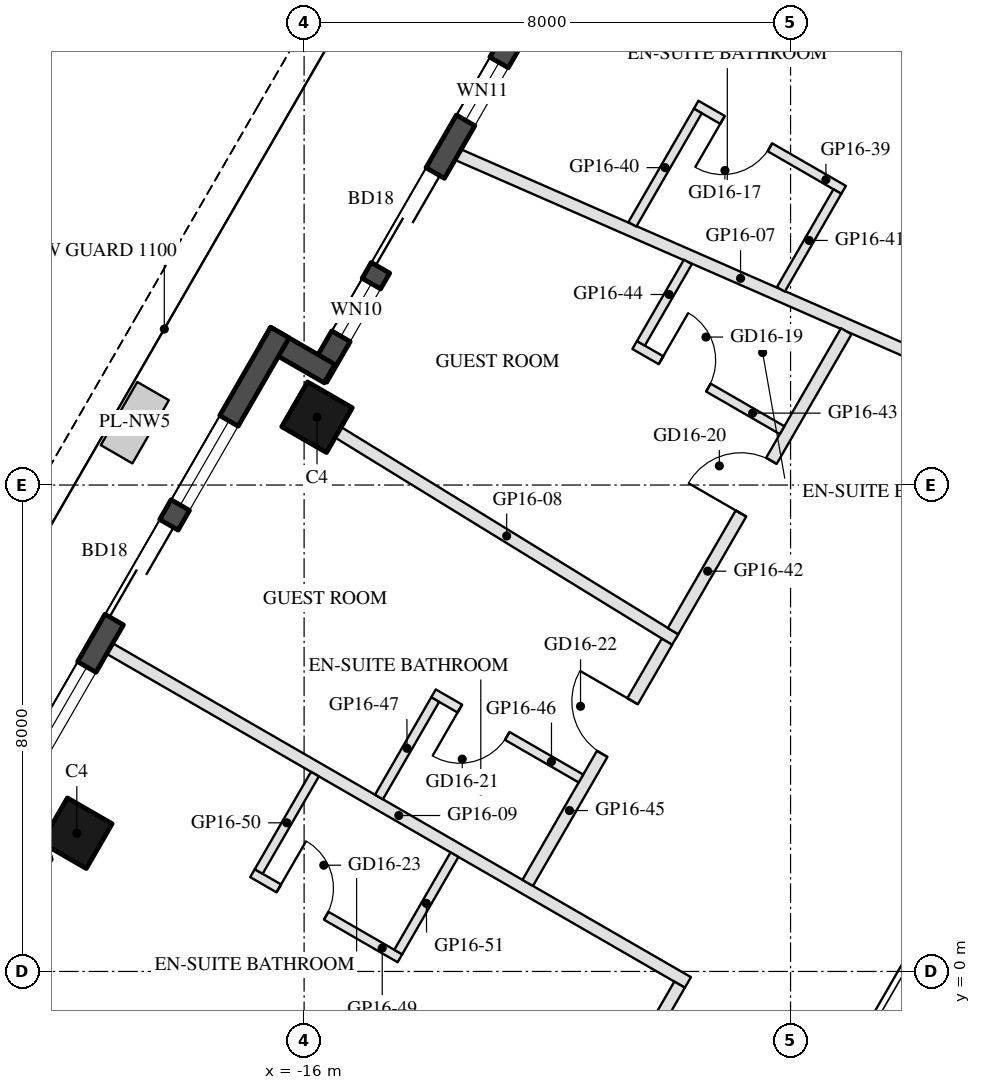
"""IFC4 building model, lengths in metres.
Left out: names, types, materials, properties, quantities, classifications, styles, units other than length and angle.
Written with IfcOpenShell. Run it as: python <this file> out.ifc"""

import sys

from ifc_helpers import new_model, si_unit, direction, frame, frame_2d, origin, origin_2d, place, context, subcontext, project, spatial, rectangle, hollow_rectangle, extrude, element, fill, save


model = new_model("IFC4")
c1 = context("Model", 3, precision=1e-05, world=origin(), true_north=direction((0.0, 1.0)))
c2 = subcontext(c1, "Body", "Model", "MODEL_VIEW")
j1 = project(units=[si_unit("LENGTHUNIT", "METRE"), si_unit("PLANEANGLEUNIT", "RADIAN")], contexts=[c1])
p1 = place(None, origin())
s1 = spatial("IfcSite", under=j1, at=p1, CompositionType="ELEMENT")
p2 = place(p1, origin())
s2 = spatial("IfcBuilding", under=s1, at=p2, CompositionType="ELEMENT")
p3 = place(p2, frame((0.0, 0.0, 179.9)))
s3 = spatial("IfcBuildingStorey", under=s2, at=p3, CompositionType="ELEMENT", Elevation=179.9)
for number, where, z_axis, x_axis in (
    (1, (-15.788, 9.115, 0.0), (0.0, 0.0, 1.0), (0.5, 0.866, 0.0)),
    (2, (-19.738, 2.273, 0.0), (0.0, 0.0, 1.0), (0.5, 0.866, 0.0)),
):
    element("IfcColumn", number, at=place(p3, frame(where, z_axis=z_axis, x_axis=x_axis)), inside=s3, PredefinedType="COLUMN", context=c2, shape_type="SweptSolid", body=[
        extrude(hollow_rectangle(XDim=0.85, YDim=0.85, WallThickness=0.04, at=origin_2d()), origin(), (0.0, 0.0, 1.0), 3.7),
    ])
p4 = place(p3, frame((-12.409, 15.617, 0.0), z_axis=(0.0, 0.0, 1.0), x_axis=(-0.500003597184, -0.866023326939, 0.0)))
e3 = element("IfcWall", 3, at=p4, inside=s3, PredefinedType="SOLIDWALL", context=c2, shape_type="SweptSolid", body=[
    extrude(rectangle(XDim=6.74, YDim=0.35, at=frame_2d((3.37, 0.0))), origin(), (0.0, 0.0, 1.0), 3.55),
])
p5 = place(p4, frame((0.77, 0.0, 0.3)))
e4 = element("IfcOpeningElement", 4, at=p5, cuts=e3, PredefinedType="OPENING", context=c2, shape_type="SweptSolid", body=[
    extrude(rectangle(XDim=1.1, YDim=2.65, at=frame_2d((0.55, 1.325))), frame((0.0, 0.185, 0.0), z_axis=(0.0, -1.0, 0.0), x_axis=(1.0, 0.0, 0.0)), (0.0, 0.0, 1.0), 0.37),
])
p6 = place(p4, frame((2.87, 0.0, 0.0)))
e5 = element("IfcOpeningElement", 5, at=p6, cuts=e3, PredefinedType="OPENING", context=c2, shape_type="SweptSolid", body=[
    extrude(rectangle(XDim=1.8, YDim=2.4, at=frame_2d((0.9, 1.2))), frame((0.0, 0.185, 0.0), z_axis=(0.0, -1.0, 0.0), x_axis=(1.0, 0.0, 0.0)), (0.0, 0.0, 1.0), 0.37),
])
p7 = place(p4, frame((4.97, 0.0, 0.3)))
e6 = element("IfcOpeningElement", 6, at=p7, cuts=e3, PredefinedType="OPENING", context=c2, shape_type="SweptSolid", body=[
    extrude(rectangle(XDim=1.0, YDim=2.65, at=frame_2d((0.5, 1.325))), frame((0.0, 0.185, 0.0), z_axis=(0.0, -1.0, 0.0), x_axis=(1.0, 0.0, 0.0)), (0.0, 0.0, 1.0), 0.37),
])
p8 = place(p3, frame((-15.581, 9.833, 0.0), z_axis=(0.0, 0.0, 1.0), x_axis=(-0.866055662726, 0.499947586314, 0.0)))
e7 = element("IfcWall", 7, at=p8, inside=s3, PredefinedType="SOLIDWALL", context=c2, shape_type="SweptSolid", body=[
    extrude(rectangle(XDim=1.22, YDim=0.35, at=frame_2d((0.61, 0.0))), origin(), (0.0, 0.0, 1.0), 3.55),
])
p9 = place(p3, frame((-16.398, 10.507, 0.0), z_axis=(0.0, 0.0, 1.0), x_axis=(-0.499999142773, -0.866025898704, 0.0)))
e8 = element("IfcWall", 8, at=p9, inside=s3, PredefinedType="SOLIDWALL", context=c2, shape_type="SweptSolid", body=[
    extrude(rectangle(XDim=9.7, YDim=0.35, at=frame_2d((4.85, 0.0))), origin(), (0.0, 0.0, 1.0), 3.55),
])
p10 = place(p9, frame((3.65, 0.0, 0.0)))
e9 = element("IfcOpeningElement", 9, at=p10, cuts=e8, PredefinedType="OPENING", context=c2, shape_type="SweptSolid", body=[
    extrude(rectangle(XDim=1.8, YDim=2.4, at=frame_2d((0.9, 1.2))), frame((0.0, 0.185, 0.0), z_axis=(0.0, -1.0, 0.0), x_axis=(1.0, 0.0, 0.0)), (0.0, 0.0, 1.0), 0.37),
])
p11 = place(p9, frame((1.675, 0.0, 0.3)))
e10 = element("IfcOpeningElement", 10, at=p11, cuts=e8, PredefinedType="OPENING", context=c2, shape_type="SweptSolid", body=[
    extrude(rectangle(XDim=1.6, YDim=2.65, at=frame_2d((0.8, 1.325))), frame((0.0, 0.185, 0.0), z_axis=(0.0, -1.0, 0.0), x_axis=(1.0, 0.0, 0.0)), (0.0, 0.0, 1.0), 0.37),
])
p12 = place(p9, frame((6.35, 0.0, 0.3)))
e11 = element("IfcOpeningElement", 11, at=p12, cuts=e8, PredefinedType="OPENING", context=c2, shape_type="SweptSolid", body=[
    extrude(rectangle(XDim=1.6, YDim=2.65, at=frame_2d((0.8, 1.325))), frame((0.0, 0.185, 0.0), z_axis=(0.0, -1.0, 0.0), x_axis=(1.0, 0.0, 0.0)), (0.0, 0.0, 1.0), 0.37),
])
p13 = place(p3, frame((-13.467, 13.434, 0.0), z_axis=(0.0, 0.0, 1.0), x_axis=(0.916026348045, -0.401118099426, 0.0)))
e12 = element("IfcWall", 12, at=p13, inside=s3, PredefinedType="PARTITIONING", context=c2, shape_type="SweptSolid", body=[
    extrude(rectangle(XDim=10.142, YDim=0.2, at=frame_2d((5.071, 0.0))), origin(), (0.0, 0.0, 1.0), 3.06),
])
p14 = place(p3, frame((-15.44, 8.867, 0.0), z_axis=(0.0, 0.0, 1.0), x_axis=(0.851787104886, -0.523888087237, 0.0)))
e13 = element("IfcWall", 13, at=p14, inside=s3, PredefinedType="PARTITIONING", context=c2, shape_type="SweptSolid", body=[
    extrude(rectangle(XDim=6.508, YDim=0.2, at=frame_2d((3.254, 0.0))), origin(), (0.0, 0.0, 1.0), 2.95),
])
p15 = place(p3, frame((-19.197, 5.31, 0.0), z_axis=(0.0, 0.0, 1.0), x_axis=(0.866027479907, -0.499996404033, 0.0)))
e14 = element("IfcWall", 14, at=p15, inside=s3, PredefinedType="PARTITIONING", context=c2, shape_type="SweptSolid", body=[
    extrude(rectangle(XDim=10.98, YDim=0.2, at=frame_2d((5.49, 0.0))), origin(), (0.0, 0.0, 1.0), 3.06),
])
p16 = place(p3, frame((-7.127, 12.855, 0.0), z_axis=(0.0, 0.0, 1.0), x_axis=(-0.866018616679, 0.500011755427, 0.0)))
e15 = element("IfcWall", 15, at=p16, inside=s3, PredefinedType="PARTITIONING", context=c2, shape_type="SweptSolid", body=[
    extrude(rectangle(XDim=2.8, YDim=0.15, at=frame_2d((1.4, 0.0))), origin(), (0.0, 0.0, 1.0), 3.55),
])
p17 = place(p16, frame((1.4, 0.0, 0.0)))
e16 = element("IfcOpeningElement", 16, at=p17, cuts=e15, PredefinedType="OPENING", context=c2, shape_type="SweptSolid", body=[
    extrude(rectangle(XDim=0.9, YDim=2.1, at=frame_2d((0.45, 1.05))), frame((0.0, 0.085, 0.0), z_axis=(0.0, -1.0, 0.0), x_axis=(1.0, 0.0, 0.0)), (0.0, 0.0, 1.0), 0.17),
])
p18 = place(p3, frame((-9.525, 14.153, 0.0), z_axis=(0.0, 0.0, 1.0), x_axis=(-0.500016891966, -0.866015650984, 0.0)))
e17 = element("IfcWall", 17, at=p18, inside=s3, PredefinedType="PARTITIONING", context=c2, shape_type="SweptSolid", body=[
    extrude(rectangle(XDim=2.153, YDim=0.15, at=frame_2d((1.077, 0.0))), origin(), (0.0, 0.0, 1.0), 3.55),
])
p19 = place(p3, frame((-7.23, 12.828, 0.0), z_axis=(0.0, 0.0, 1.0), x_axis=(-0.500010545262, -0.866019315389, 0.0)))
e18 = element("IfcWall", 18, at=p19, inside=s3, PredefinedType="PARTITIONING", context=c2, shape_type="SweptSolid", body=[
    extrude(rectangle(XDim=1.858, YDim=0.15, at=frame_2d((0.929, 0.0))), origin(), (0.0, 0.0, 1.0), 3.55),
])
p20 = place(p3, frame((-9.932, 5.597, 0.0), z_axis=(0.0, 0.0, 1.0), x_axis=(0.500006916967, 0.866021410235, 0.0)))
e19 = element("IfcWall", 19, at=p20, inside=s3, PredefinedType="PARTITIONING", context=c2, shape_type="SweptSolid", body=[
    extrude(rectangle(XDim=5.696, YDim=0.2, at=frame_2d((2.848, 0.0))), origin(), (0.0, 0.0, 1.0), 2.95),
])
p21 = place(p20, frame((2.235, 0.0, 0.0)))
e20 = element("IfcOpeningElement", 20, at=p21, cuts=e19, PredefinedType="OPENING", context=c2, shape_type="SweptSolid", body=[
    extrude(rectangle(XDim=1.0, YDim=2.1, at=frame_2d((0.5, 1.05))), frame((0.0, 0.11, 0.0), z_axis=(0.0, -1.0, 0.0), x_axis=(1.0, 0.0, 0.0)), (0.0, 0.0, 1.0), 0.22),
])
p22 = place(p3, frame((-10.564, 10.303, 0.0), z_axis=(0.0, 0.0, 1.0), x_axis=(0.865996816683, -0.500049511043, 0.0)))
e21 = element("IfcWall", 21, at=p22, inside=s3, PredefinedType="PARTITIONING", context=c2, shape_type="SweptSolid", body=[
    extrude(rectangle(XDim=2.8, YDim=0.15, at=frame_2d((1.4, 0.0))), origin(), (0.0, 0.0, 1.0), 3.55),
])
p23 = place(p22, frame((0.5, 0.0, 0.0)))
e22 = element("IfcOpeningElement", 22, at=p23, cuts=e21, PredefinedType="OPENING", context=c2, shape_type="SweptSolid", body=[
    extrude(rectangle(XDim=0.9, YDim=2.1, at=frame_2d((0.45, 1.05))), frame((0.0, 0.085, 0.0), z_axis=(0.0, -1.0, 0.0), x_axis=(1.0, 0.0, 0.0)), (0.0, 0.0, 1.0), 0.17),
])
p24 = place(p3, frame((-9.688, 11.67, 0.0), z_axis=(0.0, 0.0, 1.0), x_axis=(-0.499890974144, -0.866088340742, 0.0)))
e23 = element("IfcWall", 23, at=p24, inside=s3, PredefinedType="PARTITIONING", context=c2, shape_type="SweptSolid", body=[
    extrude(rectangle(XDim=1.547, YDim=0.15, at=frame_2d((0.773, 0.0))), origin(), (0.0, 0.0, 1.0), 2.95),
])
p25 = place(p3, frame((-12.323, 1.457, 0.0), z_axis=(0.0, 0.0, 1.0), x_axis=(0.500008507724, 0.866020491792, 0.0)))
e24 = element("IfcWall", 24, at=p25, inside=s3, PredefinedType="PARTITIONING", context=c2, shape_type="SweptSolid", body=[
    extrude(rectangle(XDim=4.581, YDim=0.2, at=frame_2d((2.29, 0.0))), origin(), (0.0, 0.0, 1.0), 2.95),
])
p26 = place(p25, frame((2.45, 0.0, 0.0)))
e25 = element("IfcOpeningElement", 25, at=p26, cuts=e24, PredefinedType="OPENING", context=c2, shape_type="SweptSolid", body=[
    extrude(rectangle(XDim=1.0, YDim=2.1, at=frame_2d((0.5, 1.05))), frame((0.0, 0.11, 0.0), z_axis=(0.0, -1.0, 0.0), x_axis=(1.0, 0.0, 0.0)), (0.0, 0.0, 1.0), 0.22),
])
p27 = place(p3, frame((-11.447, 3.174, 0.0), z_axis=(0.0, 0.0, 1.0), x_axis=(-0.866034573852, 0.49998411664, 0.0)))
e26 = element("IfcWall", 26, at=p27, inside=s3, PredefinedType="PARTITIONING", context=c2, shape_type="SweptSolid", body=[
    extrude(rectangle(XDim=2.8, YDim=0.15, at=frame_2d((1.4, 0.0))), origin(), (0.0, 0.0, 1.0), 3.55),
])
p28 = place(p27, frame((1.4, 0.0, 0.0)))
e27 = element("IfcOpeningElement", 27, at=p28, cuts=e26, PredefinedType="OPENING", context=c2, shape_type="SweptSolid", body=[
    extrude(rectangle(XDim=0.9, YDim=2.1, at=frame_2d((0.45, 1.05))), frame((0.0, 0.085, 0.0), z_axis=(0.0, -1.0, 0.0), x_axis=(1.0, 0.0, 0.0)), (0.0, 0.0, 1.0), 0.17),
])
p29 = place(p3, frame((-13.844, 4.471, 0.0), z_axis=(0.0, 0.0, 1.0), x_axis=(-0.499985172903, -0.866033964044, 0.0)))
e28 = element("IfcWall", 28, at=p29, inside=s3, PredefinedType="PARTITIONING", context=c2, shape_type="SweptSolid", body=[
    extrude(rectangle(XDim=1.85, YDim=0.15, at=frame_2d((0.925, 0.0))), origin(), (0.0, 0.0, 1.0), 2.95),
])
p30 = place(p3, frame((-12.269, -4.45, 0.0), z_axis=(0.0, 0.0, 1.0), x_axis=(0.500012125002, 0.866018403298, 0.0)))
e29 = element("IfcWall", 29, at=p30, inside=s3, PredefinedType="PARTITIONING", context=c2, shape_type="SweptSolid", body=[
    extrude(rectangle(XDim=4.888, YDim=0.2, at=frame_2d((2.444, 0.0))), origin(), (0.0, 0.0, 1.0), 2.95),
])
p31 = place(p30, frame((1.944, 0.0, 0.0)))
e30 = element("IfcOpeningElement", 30, at=p31, cuts=e29, PredefinedType="OPENING", context=c2, shape_type="SweptSolid", body=[
    extrude(rectangle(XDim=1.0, YDim=2.1, at=frame_2d((0.5, 1.05))), frame((0.0, 0.11, 0.0), z_axis=(0.0, -1.0, 0.0), x_axis=(1.0, 0.0, 0.0)), (0.0, 0.0, 1.0), 0.22),
])
p32 = place(p3, frame((-16.849, 1.616, 0.0), z_axis=(0.0, 0.0, 1.0), x_axis=(0.866056369097, -0.49994636267, 0.0)))
e31 = element("IfcWall", 31, at=p32, inside=s3, PredefinedType="PARTITIONING", context=c2, shape_type="SweptSolid", body=[
    extrude(rectangle(XDim=2.8, YDim=0.15, at=frame_2d((1.4, 0.0))), origin(), (0.0, 0.0, 1.0), 3.55),
])
p33 = place(p32, frame((0.5, 0.0, 0.0)))
e32 = element("IfcOpeningElement", 32, at=p33, cuts=e31, PredefinedType="OPENING", context=c2, shape_type="SweptSolid", body=[
    extrude(rectangle(XDim=0.9, YDim=2.1, at=frame_2d((0.45, 1.05))), frame((0.0, 0.085, 0.0), z_axis=(0.0, -1.0, 0.0), x_axis=(1.0, 0.0, 0.0)), (0.0, 0.0, 1.0), 0.17),
])
for number, where, z_axis, x_axis in (
    (33, (-15.822, 3.246, 0.0), (0.0, 0.0, 1.0), (-0.5, -0.866, 0.0)),
    (34, (-13.527, 1.921, 0.0), (0.0, 0.0, 1.0), (-0.5, -0.866, 0.0)),
):
    element("IfcWall", number, at=place(p3, frame(where, z_axis=z_axis, x_axis=x_axis)), inside=s3, PredefinedType="PARTITIONING", context=c2, shape_type="SweptSolid", body=[
        extrude(rectangle(XDim=1.85, YDim=0.15, at=frame_2d((0.925, 0.0))), origin(), (0.0, 0.0, 1.0), 3.55),
    ])
p34 = place(p5, origin())
e35 = element("IfcWindow", 35, at=p34, inside=s3, PartitioningType="SINGLE_PANEL", PredefinedType="WINDOW", context=c2, shape_type="SweptSolid", body=[
    extrude(rectangle(XDim=1.1, YDim=2.65, at=frame_2d((0.55, 1.325))), frame((0.0, 0.03, 0.0), z_axis=(0.0, -1.0, 0.0), x_axis=(1.0, 0.0, 0.0)), (0.0, 0.0, 1.0), 0.06),
])
fill(e4, e35)
p35 = place(p6, frame((1.8, 0.0, 0.0), z_axis=(0.0, 0.0, 1.0), x_axis=(-1.0, 0.0, 0.0)))
e36 = element("IfcDoor", 36, at=p35, inside=s3, OperationType="SLIDING_TO_LEFT", PredefinedType="DOOR", context=c2, shape_type="SweptSolid", body=[
    extrude(rectangle(XDim=1.8, YDim=2.4, at=frame_2d((0.9, 1.2))), frame((0.0, 0.025, 0.0), z_axis=(0.0, -1.0, 0.0), x_axis=(1.0, 0.0, 0.0)), (0.0, 0.0, 1.0), 0.05),
])
fill(e5, e36)
p36 = place(p7, origin())
e37 = element("IfcWindow", 37, at=p36, inside=s3, PartitioningType="SINGLE_PANEL", PredefinedType="WINDOW", context=c2, shape_type="SweptSolid", body=[
    extrude(rectangle(XDim=1.0, YDim=2.65, at=frame_2d((0.5, 1.325))), frame((0.0, 0.03, 0.0), z_axis=(0.0, -1.0, 0.0), x_axis=(1.0, 0.0, 0.0)), (0.0, 0.0, 1.0), 0.06),
])
fill(e6, e37)
p37 = place(p10, frame((1.8, 0.0, 0.0), z_axis=(0.0, 0.0, 1.0), x_axis=(-1.0, 0.0, 0.0)))
e38 = element("IfcDoor", 38, at=p37, inside=s3, OperationType="SLIDING_TO_LEFT", PredefinedType="DOOR", context=c2, shape_type="SweptSolid", body=[
    extrude(rectangle(XDim=1.8, YDim=2.4, at=frame_2d((0.9, 1.2))), frame((0.0, 0.025, 0.0), z_axis=(0.0, -1.0, 0.0), x_axis=(1.0, 0.0, 0.0)), (0.0, 0.0, 1.0), 0.05),
])
fill(e9, e38)
p38 = place(p11, origin())
e39 = element("IfcWindow", 39, at=p38, inside=s3, PartitioningType="SINGLE_PANEL", PredefinedType="WINDOW", context=c2, shape_type="SweptSolid", body=[
    extrude(rectangle(XDim=1.6, YDim=2.65, at=frame_2d((0.8, 1.325))), frame((0.0, 0.03, 0.0), z_axis=(0.0, -1.0, 0.0), x_axis=(1.0, 0.0, 0.0)), (0.0, 0.0, 1.0), 0.06),
])
fill(e10, e39)
p39 = place(p12, origin())
e40 = element("IfcWindow", 40, at=p39, inside=s3, PartitioningType="SINGLE_PANEL", PredefinedType="WINDOW", context=c2, shape_type="SweptSolid", body=[
    extrude(rectangle(XDim=1.6, YDim=2.65, at=frame_2d((0.8, 1.325))), frame((0.0, 0.03, 0.0), z_axis=(0.0, -1.0, 0.0), x_axis=(1.0, 0.0, 0.0)), (0.0, 0.0, 1.0), 0.06),
])
fill(e11, e40)
p40 = place(p17, origin())
e41 = element("IfcDoor", 41, at=p40, inside=s3, OperationType="SINGLE_SWING_RIGHT", PredefinedType="DOOR", context=c2, shape_type="SweptSolid", body=[
    extrude(rectangle(XDim=0.9, YDim=2.1, at=frame_2d((0.45, 1.05))), frame((0.0, 0.025, 0.0), z_axis=(0.0, -1.0, 0.0), x_axis=(1.0, 0.0, 0.0)), (0.0, 0.0, 1.0), 0.05),
])
fill(e16, e41)
p41 = place(p23, origin())
e42 = element("IfcDoor", 42, at=p41, inside=s3, OperationType="SINGLE_SWING_LEFT", PredefinedType="DOOR", context=c2, shape_type="SweptSolid", body=[
    extrude(rectangle(XDim=0.9, YDim=2.1, at=frame_2d((0.45, 1.05))), frame((0.0, 0.025, 0.0), z_axis=(0.0, -1.0, 0.0), x_axis=(1.0, 0.0, 0.0)), (0.0, 0.0, 1.0), 0.05),
])
fill(e22, e42)
p42 = place(p21, origin())
e43 = element("IfcDoor", 43, at=p42, inside=s3, OperationType="SINGLE_SWING_LEFT", PredefinedType="DOOR", context=c2, shape_type="SweptSolid", body=[
    extrude(rectangle(XDim=1.0, YDim=2.1, at=frame_2d((0.5, 1.05))), frame((0.0, 0.025, 0.0), z_axis=(0.0, -1.0, 0.0), x_axis=(1.0, 0.0, 0.0)), (0.0, 0.0, 1.0), 0.05),
])
fill(e20, e43)
p43 = place(p28, origin())
e44 = element("IfcDoor", 44, at=p43, inside=s3, OperationType="SINGLE_SWING_RIGHT", PredefinedType="DOOR", context=c2, shape_type="SweptSolid", body=[
    extrude(rectangle(XDim=0.9, YDim=2.1, at=frame_2d((0.45, 1.05))), frame((0.0, 0.025, 0.0), z_axis=(0.0, -1.0, 0.0), x_axis=(1.0, 0.0, 0.0)), (0.0, 0.0, 1.0), 0.05),
])
fill(e27, e44)
p44 = place(p26, origin())
e45 = element("IfcDoor", 45, at=p44, inside=s3, OperationType="SINGLE_SWING_RIGHT", PredefinedType="DOOR", context=c2, shape_type="SweptSolid", body=[
    extrude(rectangle(XDim=1.0, YDim=2.1, at=frame_2d((0.5, 1.05))), frame((0.0, 0.025, 0.0), z_axis=(0.0, -1.0, 0.0), x_axis=(1.0, 0.0, 0.0)), (0.0, 0.0, 1.0), 0.05),
])
fill(e25, e45)
p45 = place(p33, origin())
e46 = element("IfcDoor", 46, at=p45, inside=s3, OperationType="SINGLE_SWING_LEFT", PredefinedType="DOOR", context=c2, shape_type="SweptSolid", body=[
    extrude(rectangle(XDim=0.9, YDim=2.1, at=frame_2d((0.45, 1.05))), frame((0.0, 0.025, 0.0), z_axis=(0.0, -1.0, 0.0), x_axis=(1.0, 0.0, 0.0)), (0.0, 0.0, 1.0), 0.05),
])
fill(e32, e46)
save(model, sys.argv[1])
